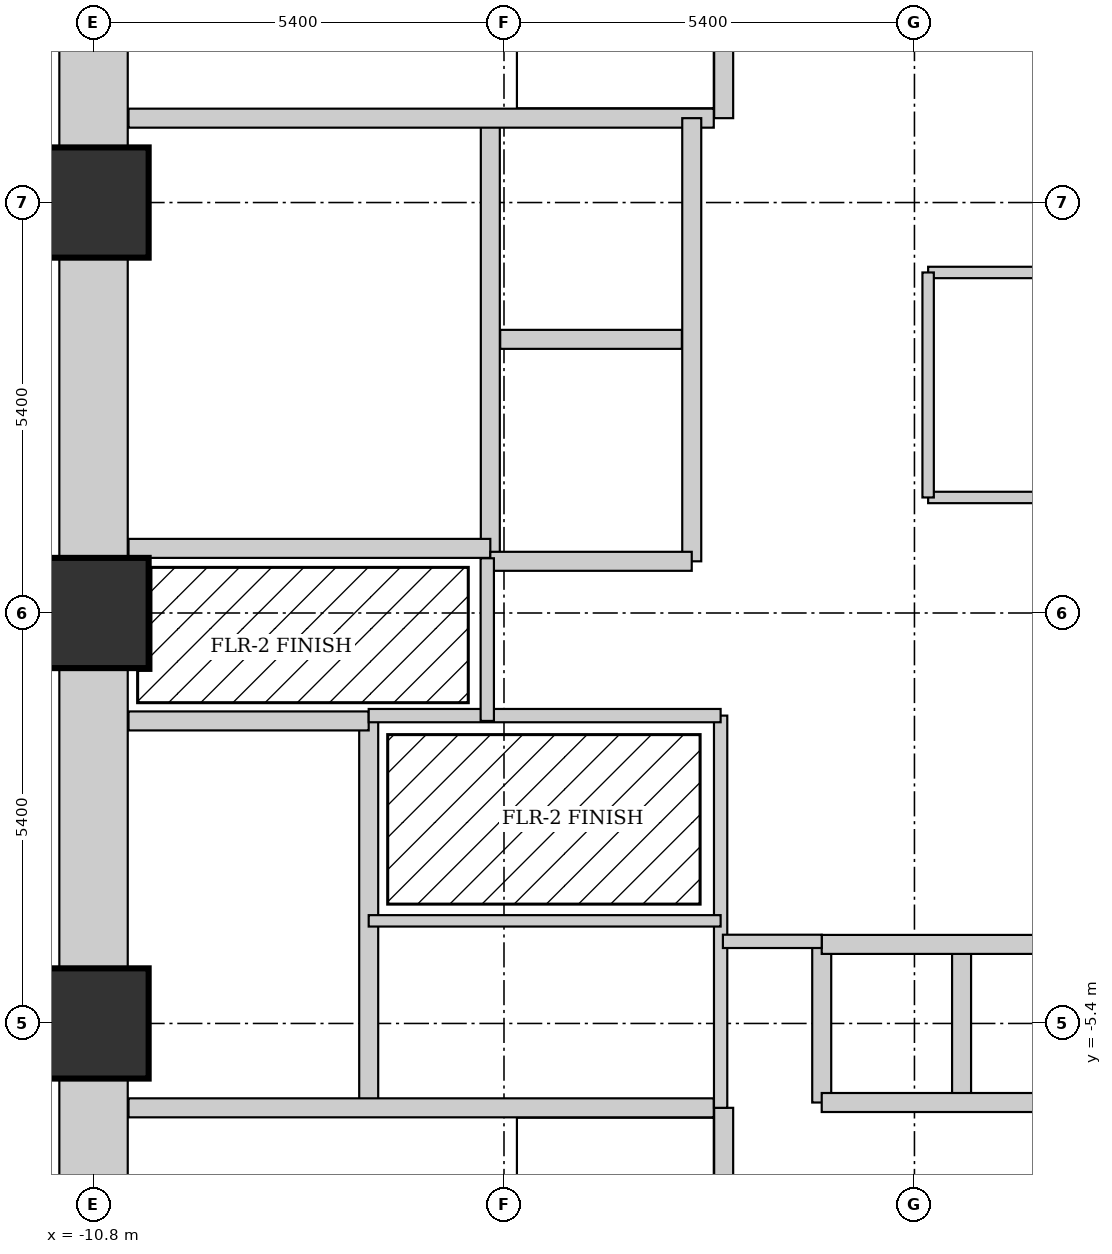
"""IFC4 building model, lengths in metres.
Left out: names, types, materials, properties, quantities, classifications, styles, units other than length and angle.
Written with IfcOpenShell. Run it as: python <this file> out.ifc"""

import sys

from ifc_helpers import new_model, si_unit, direction, frame, frame_2d, origin, origin_2d, place, context, subcontext, project, spatial, rectangle, extrude, element, fill, save


model = new_model("IFC4")
c1 = context("Model", 3, precision=1e-05, world=origin(), true_north=direction((0.0, 1.0)))
c2 = subcontext(c1, "Body", "Model", "MODEL_VIEW")
j1 = project(units=[si_unit("LENGTHUNIT", "METRE"), si_unit("PLANEANGLEUNIT", "RADIAN")], contexts=[c1])
p1 = place(None, origin())
s1 = spatial("IfcSite", under=j1, at=p1, CompositionType="ELEMENT")
p2 = place(p1, origin())
s2 = spatial("IfcBuilding", under=s1, at=p2, CompositionType="ELEMENT")
p3 = place(p2, origin())
s3 = spatial("IfcBuildingStorey", under=s2, at=p3, CompositionType="ELEMENT", Elevation=0.0)
for number, where, z_axis, x_axis in (
    (1, (-10.8, -5.4, 0.0), (0.0, 0.0, 1.0), (1.0, 0.0, 0.0)),
    (2, (-10.8, 0.0, 0.0), (0.0, 0.0, 1.0), (1.0, 0.0, 0.0)),
    (3, (-10.8, 5.4, 0.0), (0.0, 0.0, 1.0), (1.0, 0.0, 0.0)),
):
    element("IfcColumn", number, at=place(p3, frame(where, z_axis=z_axis, x_axis=x_axis)), inside=s3, PredefinedType="COLUMN", context=c2, shape_type="SweptSolid", body=[
        extrude(rectangle(XDim=1.45, YDim=1.45, at=origin_2d()), origin(), (0.0, 0.0, 1.0), 4.5),
    ])
p4 = place(p3, frame((-10.8, -10.065, 0.0), z_axis=(0.0, 0.0, 1.0), x_axis=(0.0, 1.0, 0.0)))
e4 = element("IfcWall", 4, at=p4, inside=s3, PredefinedType="SHEAR", context=c2, shape_type="SweptSolid", body=[
    extrude(rectangle(XDim=3.93, YDim=0.9, at=frame_2d((1.965, 0.0))), origin(), (0.0, 0.0, 1.0), 4.5),
])
p5 = place(p3, frame((-10.8, -4.665, 0.0), z_axis=(0.0, 0.0, 1.0), x_axis=(0.0, 1.0, 0.0)))
e5 = element("IfcWall", 5, at=p5, inside=s3, PredefinedType="SHEAR", context=c2, shape_type="SweptSolid", body=[
    extrude(rectangle(XDim=3.93, YDim=0.9, at=frame_2d((1.965, 0.0))), origin(), (0.0, 0.0, 1.0), 4.5),
])
p6 = place(p5, frame((1.415, 0.0, 0.0)))
e6 = element("IfcOpeningElement", 6, at=p6, cuts=e5, PredefinedType="OPENING", context=c2, shape_type="SweptSolid", body=[
    extrude(rectangle(XDim=1.1, YDim=2.1, at=frame_2d((0.55, 1.05))), frame((0.0, 0.46, 0.0), z_axis=(0.0, -1.0, 0.0), x_axis=(1.0, 0.0, 0.0)), (0.0, 0.0, 1.0), 0.92),
])
p7 = place(p3, frame((-10.8, 0.735, 0.0), z_axis=(0.0, 0.0, 1.0), x_axis=(0.0, 1.0, 0.0)))
e7 = element("IfcWall", 7, at=p7, inside=s3, PredefinedType="SHEAR", context=c2, shape_type="SweptSolid", body=[
    extrude(rectangle(XDim=3.93, YDim=0.9, at=frame_2d((1.965, 0.0))), origin(), (0.0, 0.0, 1.0), 4.5),
])
p8 = place(p7, frame((1.415, 0.0, 0.0)))
e8 = element("IfcOpeningElement", 8, at=p8, cuts=e7, PredefinedType="OPENING", context=c2, shape_type="SweptSolid", body=[
    extrude(rectangle(XDim=1.1, YDim=2.1, at=frame_2d((0.55, 1.05))), frame((0.0, 0.46, 0.0), z_axis=(0.0, -1.0, 0.0), x_axis=(1.0, 0.0, 0.0)), (0.0, 0.0, 1.0), 0.92),
])
p9 = place(p3, frame((-10.8, 6.135, 0.0), z_axis=(0.0, 0.0, 1.0), x_axis=(0.0, 1.0, 0.0)))
e9 = element("IfcWall", 9, at=p9, inside=s3, PredefinedType="SHEAR", context=c2, shape_type="SweptSolid", body=[
    extrude(rectangle(XDim=3.93, YDim=0.9, at=frame_2d((1.965, 0.0))), origin(), (0.0, 0.0, 1.0), 4.5),
])
p10 = place(p3, frame((-5.58, 0.72, 0.0), z_axis=(0.0, 0.0, 1.0), x_axis=(0.0, 1.0, 0.0)))
e10 = element("IfcWall", 10, at=p10, inside=s3, PredefinedType="SHEAR", context=c2, shape_type="SweptSolid", body=[
    extrude(rectangle(XDim=5.79, YDim=0.25, at=frame_2d((2.895, 0.0))), origin(), (0.0, 0.0, 1.0), 4.5),
])
p11 = place(p10, frame((3.35, 0.0, 0.0)))
e11 = element("IfcOpeningElement", 11, at=p11, cuts=e10, PredefinedType="OPENING", context=c2, shape_type="SweptSolid", body=[
    extrude(rectangle(XDim=1.1, YDim=2.1, at=frame_2d((0.55, 1.05))), frame((0.0, 0.135, 0.0), z_axis=(0.0, -1.0, 0.0), x_axis=(1.0, 0.0, 0.0)), (0.0, 0.0, 1.0), 0.27),
])
p12 = place(p3, frame((-10.34, 0.85, 0.0), z_axis=(0.0, 0.0, 1.0), x_axis=(1.0, 0.0, 0.0)))
e12 = element("IfcWall", 12, at=p12, inside=s3, PredefinedType="SHEAR", context=c2, shape_type="SweptSolid", body=[
    extrude(rectangle(XDim=4.76, YDim=0.25, at=frame_2d((2.38, 0.0))), origin(), (0.0, 0.0, 1.0), 4.5),
])
p13 = place(p12, frame((1.2, 0.0, 0.0)))
e13 = element("IfcOpeningElement", 13, at=p13, cuts=e12, PredefinedType="OPENING", context=c2, shape_type="SweptSolid", body=[
    extrude(rectangle(XDim=0.85, YDim=2.1, at=frame_2d((0.425, 1.05))), frame((0.0, 0.135, 0.0), z_axis=(0.0, -1.0, 0.0), x_axis=(1.0, 0.0, 0.0)), (0.0, 0.0, 1.0), 0.27),
])
p14 = place(p3, frame((0.62, -6.34, 0.0), z_axis=(0.0, 0.0, 1.0), x_axis=(0.0, 1.0, 0.0)))
e14 = element("IfcWall", 14, at=p14, inside=s3, PredefinedType="SHEAR", context=c2, shape_type="SweptSolid", body=[
    extrude(rectangle(XDim=1.88, YDim=0.25, at=frame_2d((0.94, 0.0))), origin(), (0.0, 0.0, 1.0), 4.5),
])
p15 = place(p3, frame((-1.22, -6.44, 0.0), z_axis=(0.0, 0.0, 1.0), x_axis=(0.0, 1.0, 0.0)))
e15 = element("IfcWall", 15, at=p15, inside=s3, PredefinedType="SHEAR", context=c2, shape_type="SweptSolid", body=[
    extrude(rectangle(XDim=2.08, YDim=0.25, at=frame_2d((1.04, 0.0))), origin(), (0.0, 0.0, 1.0), 4.5),
])
p16 = place(p3, frame((-1.22, -6.44, 0.0), z_axis=(0.0, 0.0, 1.0), x_axis=(1.0, 0.0, 0.0)))
e16 = element("IfcWall", 16, at=p16, inside=s3, PredefinedType="SHEAR", context=c2, shape_type="SweptSolid", body=[
    extrude(rectangle(XDim=3.67, YDim=0.25, at=frame_2d((1.835, 0.0))), origin(), (0.0, 0.0, 1.0), 4.5),
])
p17 = place(p16, frame((0.35, 0.0, 0.0)))
e17 = element("IfcOpeningElement", 17, at=p17, cuts=e16, PredefinedType="OPENING", context=c2, shape_type="SweptSolid", body=[
    extrude(rectangle(XDim=1.1, YDim=2.1, at=frame_2d((0.55, 1.05))), frame((0.0, 0.135, 0.0), z_axis=(0.0, -1.0, 0.0), x_axis=(1.0, 0.0, 0.0)), (0.0, 0.0, 1.0), 0.27),
])
p18 = place(p16, frame((2.22, 0.0, 0.0)))
e18 = element("IfcOpeningElement", 18, at=p18, cuts=e16, PredefinedType="OPENING", context=c2, shape_type="SweptSolid", body=[
    extrude(rectangle(XDim=1.1, YDim=2.1, at=frame_2d((0.55, 1.05))), frame((0.0, 0.135, 0.0), z_axis=(0.0, -1.0, 0.0), x_axis=(1.0, 0.0, 0.0)), (0.0, 0.0, 1.0), 0.27),
])
p19 = place(p3, frame((-1.22, -4.36, 0.0), z_axis=(0.0, 0.0, 1.0), x_axis=(1.0, 0.0, 0.0)))
e19 = element("IfcWall", 19, at=p19, inside=s3, PredefinedType="SHEAR", context=c2, shape_type="SweptSolid", body=[
    extrude(rectangle(XDim=4.03, YDim=0.25, at=frame_2d((2.015, 0.0))), origin(), (0.0, 0.0, 1.0), 4.5),
])
p20 = place(p3, frame((-2.51, 6.51, 0.0), z_axis=(0.0, 0.0, 1.0), x_axis=(0.0, 1.0, 0.0)))
e20 = element("IfcWall", 20, at=p20, inside=s3, PredefinedType="SHEAR", context=c2, shape_type="SweptSolid", body=[
    extrude(rectangle(XDim=3.84, YDim=0.25, at=frame_2d((1.92, 0.0))), origin(), (0.0, 0.0, 1.0), 4.5),
])
p21 = place(p3, frame((-10.34, 6.51, 0.0), z_axis=(0.0, 0.0, 1.0), x_axis=(1.0, 0.0, 0.0)))
e21 = element("IfcWall", 21, at=p21, inside=s3, PredefinedType="SHEAR", context=c2, shape_type="SweptSolid", body=[
    extrude(rectangle(XDim=7.7, YDim=0.25, at=frame_2d((3.85, 0.0))), origin(), (0.0, 0.0, 1.0), 4.5),
])
p22 = place(p21, frame((0.35, 0.0, 0.0)))
e22 = element("IfcOpeningElement", 22, at=p22, cuts=e21, PredefinedType="OPENING", context=c2, shape_type="SweptSolid", body=[
    extrude(rectangle(XDim=1.1, YDim=2.1, at=frame_2d((0.55, 1.05))), frame((0.0, 0.135, 0.0), z_axis=(0.0, -1.0, 0.0), x_axis=(1.0, 0.0, 0.0)), (0.0, 0.0, 1.0), 0.27),
])
p23 = place(p3, frame((-2.51, -10.35, 0.0), z_axis=(0.0, 0.0, 1.0), x_axis=(0.0, 1.0, 0.0)))
e23 = element("IfcWall", 23, at=p23, inside=s3, PredefinedType="SHEAR", context=c2, shape_type="SweptSolid", body=[
    extrude(rectangle(XDim=3.84, YDim=0.25, at=frame_2d((1.92, 0.0))), origin(), (0.0, 0.0, 1.0), 4.5),
])
p24 = place(p3, frame((-7.18, -6.51, 0.0), z_axis=(0.0, 0.0, 1.0), x_axis=(0.0, 1.0, 0.0)))
e24 = element("IfcWall", 24, at=p24, inside=s3, PredefinedType="SHEAR", context=c2, shape_type="SweptSolid", body=[
    extrude(rectangle(XDim=5.09, YDim=0.25, at=frame_2d((2.545, 0.0))), origin(), (0.0, 0.0, 1.0), 4.5),
])
p25 = place(p3, frame((-10.34, -1.42, 0.0), z_axis=(0.0, 0.0, 1.0), x_axis=(1.0, 0.0, 0.0)))
e25 = element("IfcWall", 25, at=p25, inside=s3, PredefinedType="SHEAR", context=c2, shape_type="SweptSolid", body=[
    extrude(rectangle(XDim=3.16, YDim=0.25, at=frame_2d((1.58, 0.0))), origin(), (0.0, 0.0, 1.0), 4.5),
])
p26 = place(p3, frame((-10.34, -6.51, 0.0), z_axis=(0.0, 0.0, 1.0), x_axis=(1.0, 0.0, 0.0)))
e26 = element("IfcWall", 26, at=p26, inside=s3, PredefinedType="SHEAR", context=c2, shape_type="SweptSolid", body=[
    extrude(rectangle(XDim=7.7, YDim=0.25, at=frame_2d((3.85, 0.0))), origin(), (0.0, 0.0, 1.0), 4.5),
])
p27 = place(p26, frame((0.35, 0.0, 0.0)))
e27 = element("IfcOpeningElement", 27, at=p27, cuts=e26, PredefinedType="OPENING", context=c2, shape_type="SweptSolid", body=[
    extrude(rectangle(XDim=1.1, YDim=2.1, at=frame_2d((0.55, 1.05))), frame((0.0, 0.135, 0.0), z_axis=(0.0, -1.0, 0.0), x_axis=(1.0, 0.0, 0.0)), (0.0, 0.0, 1.0), 0.27),
])
p28 = place(p3, frame((-2.93, 0.68, 0.0), z_axis=(0.0, 0.0, 1.0), x_axis=(0.0, 1.0, 0.0)))
e28 = element("IfcWall", 28, at=p28, inside=s3, PredefinedType="SHEAR", context=c2, shape_type="SweptSolid", body=[
    extrude(rectangle(XDim=5.83, YDim=0.25, at=frame_2d((2.915, 0.0))), origin(), (0.0, 0.0, 1.0), 4.5),
])
p29 = place(p28, frame((0.75, 0.0, 0.0)))
e29 = element("IfcOpeningElement", 29, at=p29, cuts=e28, PredefinedType="OPENING", context=c2, shape_type="SweptSolid", body=[
    extrude(rectangle(XDim=1.2, YDim=2.1, at=frame_2d((0.6, 1.05))), frame((0.0, 0.135, 0.0), z_axis=(0.0, -1.0, 0.0), x_axis=(1.0, 0.0, 0.0)), (0.0, 0.0, 1.0), 0.27),
])
p30 = place(p3, frame((-5.45, 3.6, 0.0), z_axis=(0.0, 0.0, 1.0), x_axis=(1.0, 0.0, 0.0)))
e30 = element("IfcWall", 30, at=p30, inside=s3, PredefinedType="SHEAR", context=c2, shape_type="SweptSolid", body=[
    extrude(rectangle(XDim=2.39, YDim=0.25, at=frame_2d((1.195, 0.0))), origin(), (0.0, 0.0, 1.0), 4.5),
])
p31 = place(p3, frame((-5.58, 0.68, 0.0), z_axis=(0.0, 0.0, 1.0), x_axis=(1.0, 0.0, 0.0)))
e31 = element("IfcWall", 31, at=p31, inside=s3, PredefinedType="SHEAR", context=c2, shape_type="SweptSolid", body=[
    extrude(rectangle(XDim=2.65, YDim=0.25, at=frame_2d((1.325, 0.0))), origin(), (0.0, 0.0, 1.0), 4.5),
])
for number, where, z_axis, x_axis in (
    (32, (0.18, 4.48, 0.0), (0.0, 0.0, 1.0), (1.0, 0.0, 0.0)),
    (33, (0.18, 1.52, 0.0), (0.0, 0.0, 1.0), (1.0, 0.0, 0.0)),
):
    element("IfcWall", number, at=place(p3, frame(where, z_axis=z_axis, x_axis=x_axis)), inside=s3, PredefinedType="PARTITIONING", context=c2, shape_type="SweptSolid", body=[
        extrude(rectangle(XDim=2.67, YDim=0.15, at=frame_2d((1.335, 0.0))), origin(), (0.0, 0.0, 1.0), 4.2),
    ])
p32 = place(p3, frame((0.18, 1.52, 0.0), z_axis=(0.0, 0.0, 1.0), x_axis=(0.0, 1.0, 0.0)))
e34 = element("IfcWall", 34, at=p32, inside=s3, PredefinedType="PARTITIONING", context=c2, shape_type="SweptSolid", body=[
    extrude(rectangle(XDim=2.96, YDim=0.15, at=frame_2d((1.48, 0.0))), origin(), (0.0, 0.0, 1.0), 4.2),
])
p33 = place(p32, frame((0.95, 0.0, 0.0)))
e35 = element("IfcOpeningElement", 35, at=p33, cuts=e34, PredefinedType="OPENING", context=c2, shape_type="SweptSolid", body=[
    extrude(rectangle(XDim=0.85, YDim=2.1, at=frame_2d((0.425, 1.05))), frame((0.0, 0.085, 0.0), z_axis=(0.0, -1.0, 0.0), x_axis=(1.0, 0.0, 0.0)), (0.0, 0.0, 1.0), 0.17),
])
p34 = place(p3, frame((-2.55, -6.51, 0.0), z_axis=(0.0, 0.0, 1.0), x_axis=(0.0, 1.0, 0.0)))
e36 = element("IfcWall", 36, at=p34, inside=s3, PredefinedType="PARTITIONING", context=c2, shape_type="SweptSolid", body=[
    extrude(rectangle(XDim=5.16, YDim=0.175, at=frame_2d((2.58, 0.0))), origin(), (0.0, 0.0, 1.0), 4.2),
])
p35 = place(p34, frame((3.3, 0.0, 0.0)))
e37 = element("IfcOpeningElement", 37, at=p35, cuts=e36, PredefinedType="OPENING", context=c2, shape_type="SweptSolid", body=[
    extrude(rectangle(XDim=0.85, YDim=2.1, at=frame_2d((0.425, 1.05))), frame((0.0, 0.097, 0.0), z_axis=(0.0, -1.0, 0.0), x_axis=(1.0, 0.0, 0.0)), (0.0, 0.0, 1.0), 0.195),
])
p36 = place(p3, frame((-7.18, -4.05, 0.0), z_axis=(0.0, 0.0, 1.0), x_axis=(1.0, 0.0, 0.0)))
e38 = element("IfcWall", 38, at=p36, inside=s3, PredefinedType="PARTITIONING", context=c2, shape_type="SweptSolid", body=[
    extrude(rectangle(XDim=4.63, YDim=0.15, at=frame_2d((2.315, 0.0))), origin(), (0.0, 0.0, 1.0), 4.2),
])
p37 = place(p36, frame((1.0, 0.0, 0.0)))
e39 = element("IfcOpeningElement", 39, at=p37, cuts=e38, PredefinedType="OPENING", context=c2, shape_type="SweptSolid", body=[
    extrude(rectangle(XDim=0.85, YDim=2.1, at=frame_2d((0.425, 1.05))), frame((0.0, 0.085, 0.0), z_axis=(0.0, -1.0, 0.0), x_axis=(1.0, 0.0, 0.0)), (0.0, 0.0, 1.0), 0.17),
])
p38 = place(p3, frame((-7.18, -1.35, 0.0), z_axis=(0.0, 0.0, 1.0), x_axis=(1.0, 0.0, 0.0)))
e40 = element("IfcWall", 40, at=p38, inside=s3, PredefinedType="PARTITIONING", context=c2, shape_type="SweptSolid", body=[
    extrude(rectangle(XDim=4.63, YDim=0.175, at=frame_2d((2.315, 0.0))), origin(), (0.0, 0.0, 1.0), 4.2),
])
p39 = place(p3, frame((-5.62, -1.42, 0.0), z_axis=(0.0, 0.0, 1.0), x_axis=(0.0, 1.0, 0.0)))
e41 = element("IfcWall", 41, at=p39, inside=s3, PredefinedType="PARTITIONING", context=c2, shape_type="SweptSolid", body=[
    extrude(rectangle(XDim=2.14, YDim=0.175, at=frame_2d((1.07, 0.0))), origin(), (0.0, 0.0, 1.0), 4.2),
])
p40 = place(p3, frame((-2.52, -4.32, 0.0), z_axis=(0.0, 0.0, 1.0), x_axis=(1.0, 0.0, 0.0)))
e42 = element("IfcWall", 42, at=p40, inside=s3, PredefinedType="PARTITIONING", context=c2, shape_type="SweptSolid", body=[
    extrude(rectangle(XDim=1.3, YDim=0.175, at=frame_2d((0.65, 0.0))), origin(), (0.0, 0.0, 1.0), 4.2),
])
p41 = place(p40, frame((0.22, 0.0, 0.0)))
e43 = element("IfcOpeningElement", 43, at=p41, cuts=e42, PredefinedType="OPENING", context=c2, shape_type="SweptSolid", body=[
    extrude(rectangle(XDim=0.85, YDim=2.1, at=frame_2d((0.425, 1.05))), frame((0.0, 0.097, 0.0), z_axis=(0.0, -1.0, 0.0), x_axis=(1.0, 0.0, 0.0)), (0.0, 0.0, 1.0), 0.195),
])
p42 = place(p3, frame((-21.56, -5.9, 0.0), z_axis=(0.0, 0.0, 1.0), x_axis=(1.0, 0.0, 0.0)))
e44 = element("IfcWall", 44, at=p42, inside=s3, PredefinedType="PARTITIONING", context=c2, shape_type="SweptSolid", body=[
    extrude(rectangle(XDim=10.71, YDim=0.2, at=frame_2d((5.355, 0.0))), origin(), (0.0, 0.0, 1.0), 3.329),
])
p43 = place(p42, frame((7.36, 0.0, 0.0)))
e45 = element("IfcOpeningElement", 45, at=p43, cuts=e44, PredefinedType="OPENING", context=c2, shape_type="SweptSolid", body=[
    extrude(rectangle(XDim=1.1, YDim=2.1, at=frame_2d((0.55, 1.05))), frame((0.0, 0.11, 0.0), z_axis=(0.0, -1.0, 0.0), x_axis=(1.0, 0.0, 0.0)), (0.0, 0.0, 1.0), 0.22),
])
p44 = place(p33, origin())
e46 = element("IfcDoor", 46, at=p44, inside=s3, OperationType="SINGLE_SWING_RIGHT", PredefinedType="DOOR", context=c2, shape_type="SweptSolid", body=[
    extrude(rectangle(XDim=0.85, YDim=2.1, at=frame_2d((0.425, 1.05))), frame((0.0, 0.025, 0.0), z_axis=(0.0, -1.0, 0.0), x_axis=(1.0, 0.0, 0.0)), (0.0, 0.0, 1.0), 0.05),
])
fill(e35, e46)
p45 = place(p22, origin())
e47 = element("IfcDoor", 47, at=p45, inside=s3, OperationType="SINGLE_SWING_LEFT", PredefinedType="DOOR", context=c2, shape_type="SweptSolid", body=[
    extrude(rectangle(XDim=1.1, YDim=2.1, at=frame_2d((0.55, 1.05))), frame((0.0, 0.025, 0.0), z_axis=(0.0, -1.0, 0.0), x_axis=(1.0, 0.0, 0.0)), (0.0, 0.0, 1.0), 0.05),
])
fill(e22, e47)
p46 = place(p27, origin())
e48 = element("IfcDoor", 48, at=p46, inside=s3, OperationType="SINGLE_SWING_RIGHT", PredefinedType="DOOR", context=c2, shape_type="SweptSolid", body=[
    extrude(rectangle(XDim=1.1, YDim=2.1, at=frame_2d((0.55, 1.05))), frame((0.0, 0.025, 0.0), z_axis=(0.0, -1.0, 0.0), x_axis=(1.0, 0.0, 0.0)), (0.0, 0.0, 1.0), 0.05),
])
fill(e27, e48)
p47 = place(p8, origin())
e49 = element("IfcDoor", 49, at=p47, inside=s3, OperationType="SINGLE_SWING_LEFT", PredefinedType="DOOR", context=c2, shape_type="SweptSolid", body=[
    extrude(rectangle(XDim=1.1, YDim=2.1, at=frame_2d((0.55, 1.05))), frame((0.0, 0.025, 0.0), z_axis=(0.0, -1.0, 0.0), x_axis=(1.0, 0.0, 0.0)), (0.0, 0.0, 1.0), 0.05),
])
fill(e8, e49)
p48 = place(p6, origin())
e50 = element("IfcDoor", 50, at=p48, inside=s3, OperationType="SINGLE_SWING_LEFT", PredefinedType="DOOR", context=c2, shape_type="SweptSolid", body=[
    extrude(rectangle(XDim=1.1, YDim=2.1, at=frame_2d((0.55, 1.05))), frame((0.0, 0.025, 0.0), z_axis=(0.0, -1.0, 0.0), x_axis=(1.0, 0.0, 0.0)), (0.0, 0.0, 1.0), 0.05),
])
fill(e6, e50)
p49 = place(p13, origin())
e51 = element("IfcDoor", 51, at=p49, inside=s3, OperationType="SINGLE_SWING_RIGHT", PredefinedType="DOOR", context=c2, shape_type="SweptSolid", body=[
    extrude(rectangle(XDim=0.85, YDim=2.1, at=frame_2d((0.425, 1.05))), frame((0.0, 0.025, 0.0), z_axis=(0.0, -1.0, 0.0), x_axis=(1.0, 0.0, 0.0)), (0.0, 0.0, 1.0), 0.05),
])
fill(e13, e51)
p50 = place(p11, origin())
e52 = element("IfcDoor", 52, at=p50, inside=s3, OperationType="SLIDING_TO_LEFT", PredefinedType="DOOR", context=c2, shape_type="SweptSolid", body=[
    extrude(rectangle(XDim=1.1, YDim=2.1, at=frame_2d((0.55, 1.05))), frame((0.0, 0.025, 0.0), z_axis=(0.0, -1.0, 0.0), x_axis=(1.0, 0.0, 0.0)), (0.0, 0.0, 1.0), 0.05),
])
fill(e11, e52)
p51 = place(p29, origin())
e53 = element("IfcDoor", 53, at=p51, inside=s3, OperationType="SLIDING_TO_LEFT", PredefinedType="DOOR", context=c2, shape_type="SweptSolid", body=[
    extrude(rectangle(XDim=1.2, YDim=2.1, at=frame_2d((0.6, 1.05))), frame((0.0, 0.025, 0.0), z_axis=(0.0, -1.0, 0.0), x_axis=(1.0, 0.0, 0.0)), (0.0, 0.0, 1.0), 0.05),
])
fill(e29, e53)
p52 = place(p41, origin())
e54 = element("IfcDoor", 54, at=p52, inside=s3, OperationType="SINGLE_SWING_LEFT", PredefinedType="DOOR", context=c2, shape_type="SweptSolid", body=[
    extrude(rectangle(XDim=0.85, YDim=2.1, at=frame_2d((0.425, 1.05))), frame((0.0, 0.025, 0.0), z_axis=(0.0, -1.0, 0.0), x_axis=(1.0, 0.0, 0.0)), (0.0, 0.0, 1.0), 0.05),
])
fill(e43, e54)
p53 = place(p17, origin())
e55 = element("IfcDoor", 55, at=p53, inside=s3, OperationType="SLIDING_TO_LEFT", PredefinedType="DOOR", context=c2, shape_type="SweptSolid", body=[
    extrude(rectangle(XDim=1.1, YDim=2.1, at=frame_2d((0.55, 1.05))), frame((0.0, 0.025, 0.0), z_axis=(0.0, -1.0, 0.0), x_axis=(1.0, 0.0, 0.0)), (0.0, 0.0, 1.0), 0.05),
])
fill(e17, e55)
p54 = place(p18, origin())
e56 = element("IfcDoor", 56, at=p54, inside=s3, OperationType="SLIDING_TO_LEFT", PredefinedType="DOOR", context=c2, shape_type="SweptSolid", body=[
    extrude(rectangle(XDim=1.1, YDim=2.1, at=frame_2d((0.55, 1.05))), frame((0.0, 0.025, 0.0), z_axis=(0.0, -1.0, 0.0), x_axis=(1.0, 0.0, 0.0)), (0.0, 0.0, 1.0), 0.05),
])
fill(e18, e56)
p55 = place(p35, origin())
e57 = element("IfcDoor", 57, at=p55, inside=s3, OperationType="SINGLE_SWING_LEFT", PredefinedType="DOOR", context=c2, shape_type="SweptSolid", body=[
    extrude(rectangle(XDim=0.85, YDim=2.1, at=frame_2d((0.425, 1.05))), frame((0.0, 0.025, 0.0), z_axis=(0.0, -1.0, 0.0), x_axis=(1.0, 0.0, 0.0)), (0.0, 0.0, 1.0), 0.05),
])
fill(e37, e57)
p56 = place(p37, origin())
e58 = element("IfcDoor", 58, at=p56, inside=s3, OperationType="SINGLE_SWING_RIGHT", PredefinedType="DOOR", context=c2, shape_type="SweptSolid", body=[
    extrude(rectangle(XDim=0.85, YDim=2.1, at=frame_2d((0.425, 1.05))), frame((0.0, 0.025, 0.0), z_axis=(0.0, -1.0, 0.0), x_axis=(1.0, 0.0, 0.0)), (0.0, 0.0, 1.0), 0.05),
])
fill(e39, e58)
save(model, sys.argv[1])
